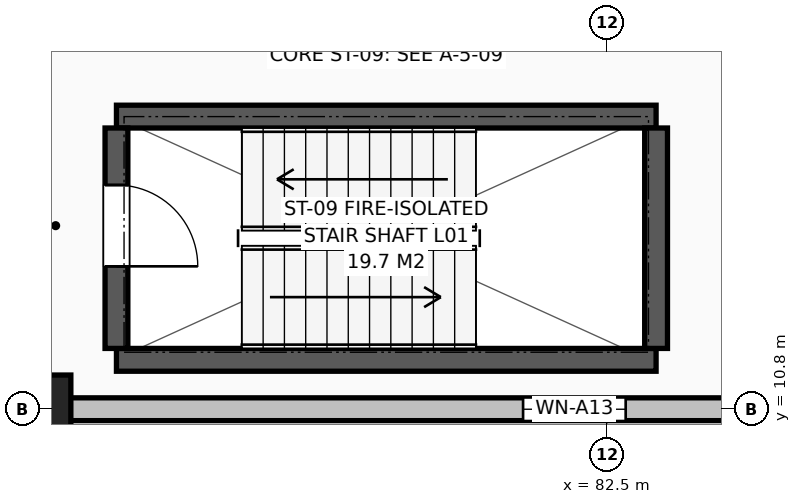
"""IFC4 building model, lengths in metres.
Left out: names, types, materials, properties, quantities, classifications, styles, units other than length and angle.
Written with IfcOpenShell. Run it as: python <this file> out.ifc"""

import sys

from ifc_helpers import new_model, si_unit, direction, frame, frame_2d, origin, origin_2d, place, context, subcontext, project, spatial, rectangle, circle, extrude, element, fill, save


model = new_model("IFC4")
c1 = context("Model", 3, precision=1e-05, world=origin(), true_north=direction((0.0, 1.0)))
c2 = subcontext(c1, "Body", "Model", "MODEL_VIEW")
j1 = project(units=[si_unit("LENGTHUNIT", "METRE"), si_unit("PLANEANGLEUNIT", "RADIAN")], contexts=[c1])
p1 = place(None, origin())
s1 = spatial("IfcSite", under=j1, at=p1, CompositionType="ELEMENT")
p2 = place(p1, origin())
s2 = spatial("IfcBuilding", under=s1, at=p2, CompositionType="ELEMENT")
p3 = place(p2, frame((0.0, 0.0, 4.8)))
s3 = spatial("IfcBuildingStorey", under=s2, at=p3, CompositionType="ELEMENT", Elevation=4.8)
p4 = place(p3, frame((75.0, 10.8, 0.0), z_axis=(0.0, 0.0, 1.0), x_axis=(1.0, 0.0, 0.0)))
e1 = element("IfcColumn", 1, at=p4, inside=s3, PredefinedType="COLUMN", context=c2, shape_type="SweptSolid", body=[
    extrude(circle(Radius=0.45, at=origin_2d()), origin(), (0.0, 0.0, 1.0), 4.2),
])
p5 = place(p3, frame((0.0, 10.8, 0.0), z_axis=(0.0, 0.0, 1.0), x_axis=(1.0, 0.0, 0.0)))
e2 = element("IfcWall", 2, at=p5, inside=s3, PredefinedType="SOLIDWALL", context=c2, shape_type="SweptSolid", body=[
    extrude(rectangle(XDim=93.6, YDim=0.3, at=frame_2d((46.8, 0.0))), origin(), (0.0, 0.0, 1.0), 3.5),
])
p6 = place(p5, frame((2.2, 0.0, 0.72)))
e3 = element("IfcOpeningElement", 3, at=p6, cuts=e2, PredefinedType="OPENING", context=c2, shape_type="SweptSolid", body=[
    extrude(rectangle(XDim=1.2, YDim=2.0, at=frame_2d((0.6, 1.0))), frame((0.0, 0.16, 0.0), z_axis=(0.0, -1.0, 0.0), x_axis=(1.0, 0.0, 0.0)), (0.0, 0.0, 1.0), 0.32),
])
p7 = place(p5, frame((9.4, 0.0, 0.72)))
e4 = element("IfcOpeningElement", 4, at=p7, cuts=e2, PredefinedType="OPENING", context=c2, shape_type="SweptSolid", body=[
    extrude(rectangle(XDim=1.35, YDim=2.05, at=frame_2d((0.675, 1.025))), frame((0.0, 0.16, 0.0), z_axis=(0.0, -1.0, 0.0), x_axis=(1.0, 0.0, 0.0)), (0.0, 0.0, 1.0), 0.32),
])
p8 = place(p5, frame((16.6, 0.0, 0.72)))
e5 = element("IfcOpeningElement", 5, at=p8, cuts=e2, PredefinedType="OPENING", context=c2, shape_type="SweptSolid", body=[
    extrude(rectangle(XDim=1.5, YDim=2.1, at=frame_2d((0.75, 1.05))), frame((0.0, 0.16, 0.0), z_axis=(0.0, -1.0, 0.0), x_axis=(1.0, 0.0, 0.0)), (0.0, 0.0, 1.0), 0.32),
])
p9 = place(p5, frame((23.8, 0.0, 0.72)))
e6 = element("IfcOpeningElement", 6, at=p9, cuts=e2, PredefinedType="OPENING", context=c2, shape_type="SweptSolid", body=[
    extrude(rectangle(XDim=1.65, YDim=2.1, at=frame_2d((0.825, 1.05))), frame((0.0, 0.16, 0.0), z_axis=(0.0, -1.0, 0.0), x_axis=(1.0, 0.0, 0.0)), (0.0, 0.0, 1.0), 0.32),
])
p10 = place(p5, frame((31.0, 0.0, 0.72)))
e7 = element("IfcOpeningElement", 7, at=p10, cuts=e2, PredefinedType="OPENING", context=c2, shape_type="SweptSolid", body=[
    extrude(rectangle(XDim=1.8, YDim=2.15, at=frame_2d((0.9, 1.075))), frame((0.0, 0.16, 0.0), z_axis=(0.0, -1.0, 0.0), x_axis=(1.0, 0.0, 0.0)), (0.0, 0.0, 1.0), 0.32),
])
p11 = place(p5, frame((38.2, 0.0, 0.72)))
e8 = element("IfcOpeningElement", 8, at=p11, cuts=e2, PredefinedType="OPENING", context=c2, shape_type="SweptSolid", body=[
    extrude(rectangle(XDim=1.2, YDim=2.0, at=frame_2d((0.6, 1.0))), frame((0.0, 0.16, 0.0), z_axis=(0.0, -1.0, 0.0), x_axis=(1.0, 0.0, 0.0)), (0.0, 0.0, 1.0), 0.32),
])
p12 = place(p5, frame((52.6, 0.0, 0.72)))
e9 = element("IfcOpeningElement", 9, at=p12, cuts=e2, PredefinedType="OPENING", context=c2, shape_type="SweptSolid", body=[
    extrude(rectangle(XDim=1.5, YDim=2.1, at=frame_2d((0.75, 1.05))), frame((0.0, 0.16, 0.0), z_axis=(0.0, -1.0, 0.0), x_axis=(1.0, 0.0, 0.0)), (0.0, 0.0, 1.0), 0.32),
])
p13 = place(p5, frame((67.0, 0.0, 0.72)))
e10 = element("IfcOpeningElement", 10, at=p13, cuts=e2, PredefinedType="OPENING", context=c2, shape_type="SweptSolid", body=[
    extrude(rectangle(XDim=1.8, YDim=2.15, at=frame_2d((0.9, 1.075))), frame((0.0, 0.16, 0.0), z_axis=(0.0, -1.0, 0.0), x_axis=(1.0, 0.0, 0.0)), (0.0, 0.0, 1.0), 0.32),
])
p14 = place(p5, frame((81.4, 0.0, 0.72)))
e11 = element("IfcOpeningElement", 11, at=p14, cuts=e2, PredefinedType="OPENING", context=c2, shape_type="SweptSolid", body=[
    extrude(rectangle(XDim=1.35, YDim=2.05, at=frame_2d((0.675, 1.025))), frame((0.0, 0.16, 0.0), z_axis=(0.0, -1.0, 0.0), x_axis=(1.0, 0.0, 0.0)), (0.0, 0.0, 1.0), 0.32),
])
for number, where, z_axis, x_axis in (
    (12, (76.05, 11.45, 0.0), (0.0, 0.0, 1.0), (1.0, 0.0, 0.0)),
    (13, (83.15, 14.65, 0.0), (0.0, 0.0, 1.0), (-1.0, 0.0, 0.0)),
):
    element("IfcWall", number, at=place(p3, frame(where, z_axis=z_axis, x_axis=x_axis)), inside=s3, PredefinedType="SHEAR", context=c2, shape_type="SweptSolid", body=[
        extrude(rectangle(XDim=7.1, YDim=0.3, at=frame_2d((3.55, 0.0))), origin(), (0.0, 0.0, 1.0), 3.9),
    ])
p15 = place(p3, frame((83.15, 11.6, 0.0), z_axis=(0.0, 0.0, 1.0), x_axis=(0.0, 1.0, 0.0)))
e14 = element("IfcWall", 14, at=p15, inside=s3, PredefinedType="SHEAR", context=c2, shape_type="SweptSolid", body=[
    extrude(rectangle(XDim=2.9, YDim=0.3, at=frame_2d((1.45, 0.0))), origin(), (0.0, 0.0, 1.0), 3.9),
])
p16 = place(p3, frame((76.05, 14.5, 0.0), z_axis=(0.0, 0.0, 1.0), x_axis=(0.0, -1.0, 0.0)))
e15 = element("IfcWall", 15, at=p16, inside=s3, PredefinedType="SHEAR", context=c2, shape_type="SweptSolid", body=[
    extrude(rectangle(XDim=2.9, YDim=0.3, at=frame_2d((1.45, 0.0))), origin(), (0.0, 0.0, 1.0), 3.9),
])
p17 = place(p16, frame((0.75, 0.0, 0.0)))
e16 = element("IfcOpeningElement", 16, at=p17, cuts=e15, PredefinedType="OPENING", context=c2, shape_type="SweptSolid", body=[
    extrude(rectangle(XDim=1.07, YDim=2.15, at=frame_2d((0.535, 1.075))), frame((0.0, 0.16, 0.0), z_axis=(0.0, -1.0, 0.0), x_axis=(1.0, 0.0, 0.0)), (0.0, 0.0, 1.0), 0.32),
])
p18 = place(p14, origin())
e17 = element("IfcWindow", 17, at=p18, inside=s3, PartitioningType="SINGLE_PANEL", PredefinedType="WINDOW", context=c2, shape_type="SweptSolid", body=[
    extrude(rectangle(XDim=1.35, YDim=2.05, at=frame_2d((0.675, 1.025))), frame((0.0, 0.03, 0.0), z_axis=(0.0, -1.0, 0.0), x_axis=(1.0, 0.0, 0.0)), (0.0, 0.0, 1.0), 0.06),
])
fill(e11, e17)
p19 = place(p17, origin())
e18 = element("IfcDoor", 18, at=p19, inside=s3, OperationType="SINGLE_SWING_RIGHT", PredefinedType="DOOR", context=c2, shape_type="SweptSolid", body=[
    extrude(rectangle(XDim=1.07, YDim=2.15, at=frame_2d((0.535, 1.075))), frame((0.0, 0.025, 0.0), z_axis=(0.0, -1.0, 0.0), x_axis=(1.0, 0.0, 0.0)), (0.0, 0.0, 1.0), 0.05),
])
fill(e16, e18)
save(model, sys.argv[1])
